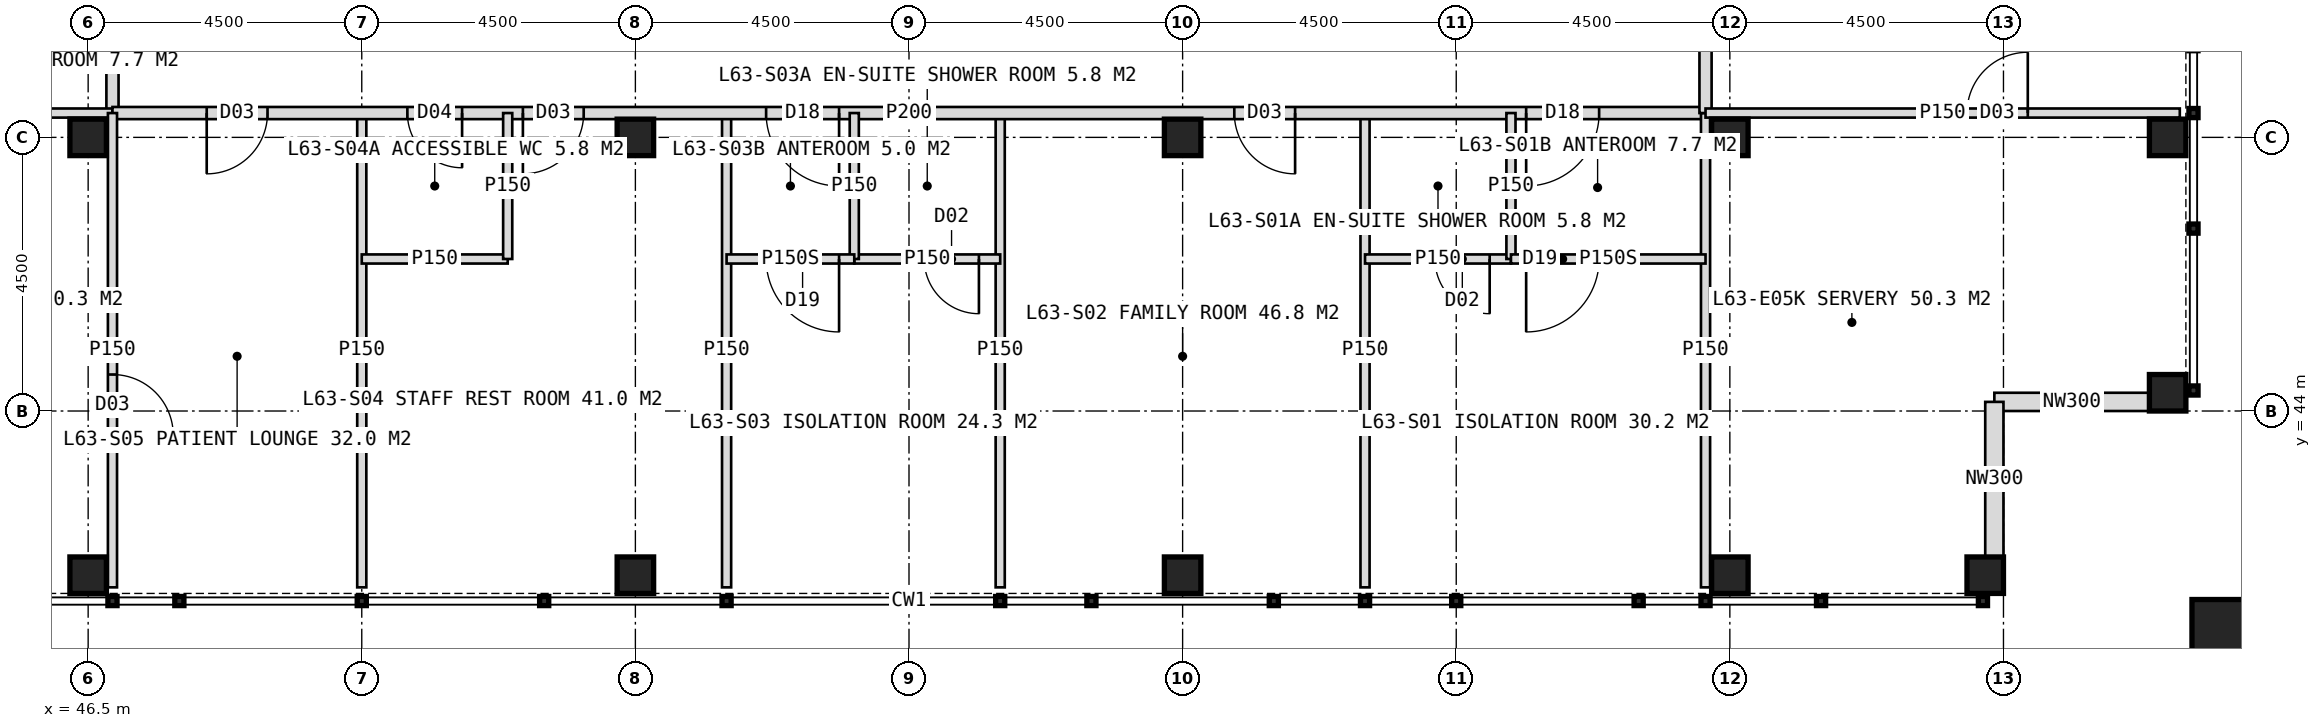
"""IFC4 building model, lengths in metres.
Left out: names, types, materials, properties, quantities, classifications, styles, units other than length and angle.
Written with IfcOpenShell. Run it as: python <this file> out.ifc"""

import sys

from ifc_helpers import new_model, si_unit, direction, frame, frame_2d, origin, origin_2d, place, context, subcontext, project, spatial, rectangle, hollow_rectangle, extrude, element, fill, save


model = new_model("IFC4")
c1 = context("Model", 3, precision=1e-05, world=origin(), true_north=direction((0.0, 1.0)))
c2 = subcontext(c1, "Body", "Model", "MODEL_VIEW")
j1 = project(units=[si_unit("LENGTHUNIT", "METRE"), si_unit("PLANEANGLEUNIT", "RADIAN")], contexts=[c1])
p1 = place(None, origin())
s1 = spatial("IfcSite", under=j1, at=p1, CompositionType="ELEMENT")
p2 = place(p1, origin())
s2 = spatial("IfcBuilding", under=s1, at=p2, CompositionType="ELEMENT")
p3 = place(p2, frame((0.0, 0.0, 262.0)))
s3 = spatial("IfcBuildingStorey", under=s2, at=p3, CompositionType="ELEMENT", Elevation=262.0)
for number, where, z_axis, x_axis in (
    (1, (46.5, 48.5, 0.0), (0.0, 0.0, 1.0), (1.0, 0.0, 0.0)),
    (2, (73.5, 48.5, 0.0), (0.0, 0.0, 1.0), (1.0, 0.0, 0.0)),
    (3, (55.5, 48.5, 0.0), (0.0, 0.0, 1.0), (1.0, 0.0, 0.0)),
    (4, (64.5, 48.5, 0.0), (0.0, 0.0, 1.0), (1.0, 0.0, 0.0)),
    (5, (80.7, 44.3, 0.0), (0.0, 0.0, 1.0), (1.0, 0.0, 0.0)),
    (6, (46.5, 41.3, 0.0), (0.0, 0.0, 1.0), (1.0, 0.0, 0.0)),
    (7, (80.7, 48.5, 0.0), (0.0, 0.0, 1.0), (1.0, 0.0, 0.0)),
    (8, (55.5, 41.3, 0.0), (0.0, 0.0, 1.0), (1.0, 0.0, 0.0)),
    (9, (64.5, 41.3, 0.0), (0.0, 0.0, 1.0), (1.0, 0.0, 0.0)),
    (10, (73.5, 41.3, 0.0), (0.0, 0.0, 1.0), (1.0, 0.0, 0.0)),
    (11, (77.7, 41.3, 0.0), (0.0, 0.0, 1.0), (1.0, 0.0, 0.0)),
):
    element("IfcColumn", number, at=place(p3, frame(where, z_axis=z_axis, x_axis=x_axis)), inside=s3, PredefinedType="COLUMN", context=c2, shape_type="SweptSolid", body=[
        extrude(hollow_rectangle(XDim=0.6, YDim=0.6, WallThickness=0.04, at=origin_2d()), origin(), (0.0, 0.0, 1.0), 4.0),
    ])
p4 = place(p3, frame((81.6, 40.4, 0.0), z_axis=(0.0, 0.0, 1.0), x_axis=(1.0, 0.0, 0.0)))
e12 = element("IfcColumn", 12, at=p4, inside=s3, PredefinedType="COLUMN", context=c2, shape_type="SweptSolid", body=[
    extrude(hollow_rectangle(XDim=1.0, YDim=1.0, WallThickness=0.06, at=origin_2d()), origin(), (0.0, 0.0, 1.0), 4.0),
])
for number, where, z_axis, x_axis in (
    (13, (80.4, 44.15, 0.0), (0.0, 0.0, 1.0), (-1.0, 0.0, 0.0)),
    (14, (77.85, 44.15, 0.0), (0.0, 0.0, 1.0), (0.0, -1.0, 0.0)),
):
    element("IfcWall", number, at=place(p3, frame(where, z_axis=z_axis, x_axis=x_axis)), inside=s3, PredefinedType="ELEMENTEDWALL", context=c2, shape_type="SweptSolid", body=[
        extrude(rectangle(XDim=2.55, YDim=0.3, at=frame_2d((1.275, 0.0))), origin(), (0.0, 0.0, 1.0), 2.95),
    ])
p5 = place(p3, frame((46.9, 48.9, 0.0), z_axis=(0.0, 0.0, 1.0), x_axis=(0.0, 1.0, 0.0)))
e15 = element("IfcWall", 15, at=p5, inside=s3, PredefinedType="PARTITIONING", context=c2, shape_type="SweptSolid", body=[
    extrude(rectangle(XDim=26.2, YDim=0.2, at=frame_2d((13.1, 0.0))), origin(), (0.0, 0.0, 1.0), 3.75),
])
p6 = place(p5, frame((1.75, 0.0, 0.0)))
e16 = element("IfcOpeningElement", 16, at=p6, cuts=e15, PredefinedType="OPENING", context=c2, shape_type="SweptSolid", body=[
    extrude(rectangle(XDim=1.2, YDim=2.2, at=frame_2d((0.6, 1.1))), frame((0.0, 0.11, 0.0), z_axis=(0.0, -1.0, 0.0), x_axis=(1.0, 0.0, 0.0)), (0.0, 0.0, 1.0), 0.22),
])
p7 = place(p5, frame((6.75, 0.0, 0.0)))
e17 = element("IfcOpeningElement", 17, at=p7, cuts=e15, PredefinedType="OPENING", context=c2, shape_type="SweptSolid", body=[
    extrude(rectangle(XDim=1.0, YDim=2.1, at=frame_2d((0.5, 1.05))), frame((0.0, 0.11, 0.0), z_axis=(0.0, -1.0, 0.0), x_axis=(1.0, 0.0, 0.0)), (0.0, 0.0, 1.0), 0.22),
])
p8 = place(p5, frame((11.1, 0.0, 0.0)))
e18 = element("IfcOpeningElement", 18, at=p8, cuts=e15, PredefinedType="OPENING", context=c2, shape_type="SweptSolid", body=[
    extrude(rectangle(XDim=1.0, YDim=2.1, at=frame_2d((0.5, 1.05))), frame((0.0, 0.11, 0.0), z_axis=(0.0, -1.0, 0.0), x_axis=(1.0, 0.0, 0.0)), (0.0, 0.0, 1.0), 0.22),
])
p9 = place(p5, frame((14.1, 0.0, 0.0)))
e19 = element("IfcOpeningElement", 19, at=p9, cuts=e15, PredefinedType="OPENING", context=c2, shape_type="SweptSolid", body=[
    extrude(rectangle(XDim=1.0, YDim=2.1, at=frame_2d((0.5, 1.05))), frame((0.0, 0.11, 0.0), z_axis=(0.0, -1.0, 0.0), x_axis=(1.0, 0.0, 0.0)), (0.0, 0.0, 1.0), 0.22),
])
p10 = place(p5, frame((18.6, 0.0, 0.0)))
e20 = element("IfcOpeningElement", 20, at=p10, cuts=e15, PredefinedType="OPENING", context=c2, shape_type="SweptSolid", body=[
    extrude(rectangle(XDim=1.0, YDim=2.1, at=frame_2d((0.5, 1.05))), frame((0.0, 0.11, 0.0), z_axis=(0.0, -1.0, 0.0), x_axis=(1.0, 0.0, 0.0)), (0.0, 0.0, 1.0), 0.22),
])
p11 = place(p5, frame((23.65, 0.0, 0.0)))
e21 = element("IfcOpeningElement", 21, at=p11, cuts=e15, PredefinedType="OPENING", context=c2, shape_type="SweptSolid", body=[
    extrude(rectangle(XDim=1.0, YDim=2.1, at=frame_2d((0.5, 1.05))), frame((0.0, 0.11, 0.0), z_axis=(0.0, -1.0, 0.0), x_axis=(1.0, 0.0, 0.0)), (0.0, 0.0, 1.0), 0.22),
])
for number, where, z_axis, x_axis in (
    (22, (46.9, 48.9, 0.0), (0.0, 0.0, 1.0), (-1.0, 0.0, 0.0)),
    (23, (67.5, 48.9, 0.0), (0.0, 0.0, 1.0), (0.0, -1.0, 0.0)),
    (24, (61.5, 48.9, 0.0), (0.0, 0.0, 1.0), (0.0, -1.0, 0.0)),
    (25, (57.0, 48.9, 0.0), (0.0, 0.0, 1.0), (0.0, -1.0, 0.0)),
    (26, (51.0, 48.9, 0.0), (0.0, 0.0, 1.0), (0.0, -1.0, 0.0)),
):
    element("IfcWall", number, at=place(p3, frame(where, z_axis=z_axis, x_axis=x_axis)), inside=s3, PredefinedType="PARTITIONING", context=c2, shape_type="SweptSolid", body=[
        extrude(rectangle(XDim=7.8, YDim=0.15, at=frame_2d((3.9, 0.0))), origin(), (0.0, 0.0, 1.0), 3.75),
    ])
p12 = place(p3, frame((73.1, 48.9, 0.0), z_axis=(0.0, 0.0, 1.0), x_axis=(-1.0, 0.0, 0.0)))
e27 = element("IfcWall", 27, at=p12, inside=s3, PredefinedType="PARTITIONING", context=c2, shape_type="SweptSolid", body=[
    extrude(rectangle(XDim=26.2, YDim=0.2, at=frame_2d((13.1, 0.0))), origin(), (0.0, 0.0, 1.0), 3.75),
])
p13 = place(p12, frame((1.75, 0.0, 0.0)))
e28 = element("IfcOpeningElement", 28, at=p13, cuts=e27, PredefinedType="OPENING", context=c2, shape_type="SweptSolid", body=[
    extrude(rectangle(XDim=1.2, YDim=2.2, at=frame_2d((0.6, 1.1))), frame((0.0, 0.11, 0.0), z_axis=(0.0, -1.0, 0.0), x_axis=(1.0, 0.0, 0.0)), (0.0, 0.0, 1.0), 0.22),
])
p14 = place(p12, frame((6.75, 0.0, 0.0)))
e29 = element("IfcOpeningElement", 29, at=p14, cuts=e27, PredefinedType="OPENING", context=c2, shape_type="SweptSolid", body=[
    extrude(rectangle(XDim=1.0, YDim=2.1, at=frame_2d((0.5, 1.05))), frame((0.0, 0.11, 0.0), z_axis=(0.0, -1.0, 0.0), x_axis=(1.0, 0.0, 0.0)), (0.0, 0.0, 1.0), 0.22),
])
p15 = place(p12, frame((14.25, 0.0, 0.0)))
e30 = element("IfcOpeningElement", 30, at=p15, cuts=e27, PredefinedType="OPENING", context=c2, shape_type="SweptSolid", body=[
    extrude(rectangle(XDim=1.2, YDim=2.2, at=frame_2d((0.6, 1.1))), frame((0.0, 0.11, 0.0), z_axis=(0.0, -1.0, 0.0), x_axis=(1.0, 0.0, 0.0)), (0.0, 0.0, 1.0), 0.22),
])
p16 = place(p12, frame((20.45, 0.0, 0.0)))
e31 = element("IfcOpeningElement", 31, at=p16, cuts=e27, PredefinedType="OPENING", context=c2, shape_type="SweptSolid", body=[
    extrude(rectangle(XDim=0.9, YDim=2.1, at=frame_2d((0.45, 1.05))), frame((0.0, 0.11, 0.0), z_axis=(0.0, -1.0, 0.0), x_axis=(1.0, 0.0, 0.0)), (0.0, 0.0, 1.0), 0.22),
])
p17 = place(p12, frame((18.45, 0.0, 0.0)))
e32 = element("IfcOpeningElement", 32, at=p17, cuts=e27, PredefinedType="OPENING", context=c2, shape_type="SweptSolid", body=[
    extrude(rectangle(XDim=1.0, YDim=2.1, at=frame_2d((0.5, 1.05))), frame((0.0, 0.11, 0.0), z_axis=(0.0, -1.0, 0.0), x_axis=(1.0, 0.0, 0.0)), (0.0, 0.0, 1.0), 0.22),
])
p18 = place(p12, frame((23.65, 0.0, 0.0)))
e33 = element("IfcOpeningElement", 33, at=p18, cuts=e27, PredefinedType="OPENING", context=c2, shape_type="SweptSolid", body=[
    extrude(rectangle(XDim=1.0, YDim=2.1, at=frame_2d((0.5, 1.05))), frame((0.0, 0.11, 0.0), z_axis=(0.0, -1.0, 0.0), x_axis=(1.0, 0.0, 0.0)), (0.0, 0.0, 1.0), 0.22),
])
p19 = place(p3, frame((73.1, 48.9, 0.0), z_axis=(0.0, 0.0, 1.0), x_axis=(0.0, -1.0, 0.0)))
e34 = element("IfcWall", 34, at=p19, inside=s3, PredefinedType="PARTITIONING", context=c2, shape_type="SweptSolid", body=[
    extrude(rectangle(XDim=7.8, YDim=0.15, at=frame_2d((3.9, 0.0))), origin(), (0.0, 0.0, 1.0), 3.75),
])
p20 = place(p3, frame((69.9, 46.5, 0.0), z_axis=(0.0, 0.0, 1.0), x_axis=(-1.0, 0.0, 0.0)))
e35 = element("IfcWall", 35, at=p20, inside=s3, PredefinedType="PARTITIONING", context=c2, shape_type="SweptSolid", body=[
    extrude(rectangle(XDim=2.4, YDim=0.15, at=frame_2d((1.2, 0.0))), origin(), (0.0, 0.0, 1.0), 3.75),
])
p21 = place(p20, frame((0.35, 0.0, 0.0)))
e36 = element("IfcOpeningElement", 36, at=p21, cuts=e35, PredefinedType="OPENING", context=c2, shape_type="SweptSolid", body=[
    extrude(rectangle(XDim=0.9, YDim=2.1, at=frame_2d((0.45, 1.05))), frame((0.0, 0.085, 0.0), z_axis=(0.0, -1.0, 0.0), x_axis=(1.0, 0.0, 0.0)), (0.0, 0.0, 1.0), 0.17),
])
p22 = place(p3, frame((69.9, 48.9, 0.0), z_axis=(0.0, 0.0, 1.0), x_axis=(0.0, -1.0, 0.0)))
e37 = element("IfcWall", 37, at=p22, inside=s3, PredefinedType="PARTITIONING", context=c2, shape_type="SweptSolid", body=[
    extrude(rectangle(XDim=2.4, YDim=0.15, at=frame_2d((1.2, 0.0))), origin(), (0.0, 0.0, 1.0), 3.75),
])
p23 = place(p3, frame((73.1, 46.5, 0.0), z_axis=(0.0, 0.0, 1.0), x_axis=(-1.0, 0.0, 0.0)))
e38 = element("IfcWall", 38, at=p23, inside=s3, PredefinedType="PARTITIONING", context=c2, shape_type="SweptSolid", body=[
    extrude(rectangle(XDim=3.2, YDim=0.15, at=frame_2d((1.6, 0.0))), origin(), (0.0, 0.0, 1.0), 3.75),
])
p24 = place(p23, frame((1.75, 0.0, 0.0)))
e39 = element("IfcOpeningElement", 39, at=p24, cuts=e38, PredefinedType="OPENING", context=c2, shape_type="SweptSolid", body=[
    extrude(rectangle(XDim=1.2, YDim=2.2, at=frame_2d((0.6, 1.1))), frame((0.0, 0.085, 0.0), z_axis=(0.0, -1.0, 0.0), x_axis=(1.0, 0.0, 0.0)), (0.0, 0.0, 1.0), 0.17),
])
p25 = place(p3, frame((61.5, 46.5, 0.0), z_axis=(0.0, 0.0, 1.0), x_axis=(-1.0, 0.0, 0.0)))
e40 = element("IfcWall", 40, at=p25, inside=s3, PredefinedType="PARTITIONING", context=c2, shape_type="SweptSolid", body=[
    extrude(rectangle(XDim=2.4, YDim=0.15, at=frame_2d((1.2, 0.0))), origin(), (0.0, 0.0, 1.0), 3.75),
])
p26 = place(p25, frame((0.35, 0.0, 0.0)))
e41 = element("IfcOpeningElement", 41, at=p26, cuts=e40, PredefinedType="OPENING", context=c2, shape_type="SweptSolid", body=[
    extrude(rectangle(XDim=0.9, YDim=2.1, at=frame_2d((0.45, 1.05))), frame((0.0, 0.085, 0.0), z_axis=(0.0, -1.0, 0.0), x_axis=(1.0, 0.0, 0.0)), (0.0, 0.0, 1.0), 0.17),
])
p27 = place(p3, frame((59.1, 48.9, 0.0), z_axis=(0.0, 0.0, 1.0), x_axis=(0.0, -1.0, 0.0)))
e42 = element("IfcWall", 42, at=p27, inside=s3, PredefinedType="PARTITIONING", context=c2, shape_type="SweptSolid", body=[
    extrude(rectangle(XDim=2.4, YDim=0.15, at=frame_2d((1.2, 0.0))), origin(), (0.0, 0.0, 1.0), 3.75),
])
p28 = place(p3, frame((59.1, 46.5, 0.0), z_axis=(0.0, 0.0, 1.0), x_axis=(-1.0, 0.0, 0.0)))
e43 = element("IfcWall", 43, at=p28, inside=s3, PredefinedType="PARTITIONING", context=c2, shape_type="SweptSolid", body=[
    extrude(rectangle(XDim=2.1, YDim=0.15, at=frame_2d((1.05, 0.0))), origin(), (0.0, 0.0, 1.0), 3.75),
])
p29 = place(p28, frame((0.25, 0.0, 0.0)))
e44 = element("IfcOpeningElement", 44, at=p29, cuts=e43, PredefinedType="OPENING", context=c2, shape_type="SweptSolid", body=[
    extrude(rectangle(XDim=1.2, YDim=2.2, at=frame_2d((0.6, 1.1))), frame((0.0, 0.085, 0.0), z_axis=(0.0, -1.0, 0.0), x_axis=(1.0, 0.0, 0.0)), (0.0, 0.0, 1.0), 0.17),
])
for number, where, z_axis, x_axis in (
    (45, (53.4, 46.5, 0.0), (0.0, 0.0, 1.0), (-1.0, 0.0, 0.0)),
    (46, (53.4, 48.9, 0.0), (0.0, 0.0, 1.0), (0.0, -1.0, 0.0)),
):
    element("IfcWall", number, at=place(p3, frame(where, z_axis=z_axis, x_axis=x_axis)), inside=s3, PredefinedType="PARTITIONING", context=c2, shape_type="SweptSolid", body=[
        extrude(rectangle(XDim=2.4, YDim=0.15, at=frame_2d((1.2, 0.0))), origin(), (0.0, 0.0, 1.0), 3.75),
    ])
p30 = place(p3, frame((46.9, 48.9, 0.0), z_axis=(0.0, 0.0, 1.0), x_axis=(0.0, -1.0, 0.0)))
e47 = element("IfcWall", 47, at=p30, inside=s3, PredefinedType="PARTITIONING", context=c2, shape_type="SweptSolid", body=[
    extrude(rectangle(XDim=7.8, YDim=0.15, at=frame_2d((3.9, 0.0))), origin(), (0.0, 0.0, 1.0), 3.75),
])
p31 = place(p30, frame((4.3, 0.0, 0.0)))
e48 = element("IfcOpeningElement", 48, at=p31, cuts=e47, PredefinedType="OPENING", context=c2, shape_type="SweptSolid", body=[
    extrude(rectangle(XDim=1.0, YDim=2.1, at=frame_2d((0.5, 1.05))), frame((0.0, 0.085, 0.0), z_axis=(0.0, -1.0, 0.0), x_axis=(1.0, 0.0, 0.0)), (0.0, 0.0, 1.0), 0.17),
])
p32 = place(p3, frame((73.1, 71.0, 0.0), z_axis=(0.0, 0.0, 1.0), x_axis=(0.0, -1.0, 0.0)))
e49 = element("IfcWall", 49, at=p32, inside=s3, PredefinedType="PARTITIONING", context=c2, shape_type="SweptSolid", body=[
    extrude(rectangle(XDim=22.1, YDim=0.2, at=frame_2d((11.05, 0.0))), origin(), (0.0, 0.0, 1.0), 3.75),
])
p33 = place(p32, frame((2.65, 0.0, 0.0)))
e50 = element("IfcOpeningElement", 50, at=p33, cuts=e49, PredefinedType="OPENING", context=c2, shape_type="SweptSolid", body=[
    extrude(rectangle(XDim=1.0, YDim=2.1, at=frame_2d((0.5, 1.05))), frame((0.0, 0.11, 0.0), z_axis=(0.0, -1.0, 0.0), x_axis=(1.0, 0.0, 0.0)), (0.0, 0.0, 1.0), 0.22),
])
p34 = place(p32, frame((7.0, 0.0, 0.0)))
e51 = element("IfcOpeningElement", 51, at=p34, cuts=e49, PredefinedType="OPENING", context=c2, shape_type="SweptSolid", body=[
    extrude(rectangle(XDim=1.0, YDim=2.1, at=frame_2d((0.5, 1.05))), frame((0.0, 0.11, 0.0), z_axis=(0.0, -1.0, 0.0), x_axis=(1.0, 0.0, 0.0)), (0.0, 0.0, 1.0), 0.22),
])
p35 = place(p32, frame((14.35, 0.0, 0.0)))
e52 = element("IfcOpeningElement", 52, at=p35, cuts=e49, PredefinedType="OPENING", context=c2, shape_type="SweptSolid", body=[
    extrude(rectangle(XDim=1.2, YDim=2.2, at=frame_2d((0.6, 1.1))), frame((0.0, 0.11, 0.0), z_axis=(0.0, -1.0, 0.0), x_axis=(1.0, 0.0, 0.0)), (0.0, 0.0, 1.0), 0.22),
])
p36 = place(p32, frame((18.7, 0.0, 0.0)))
e53 = element("IfcOpeningElement", 53, at=p36, cuts=e49, PredefinedType="OPENING", context=c2, shape_type="SweptSolid", body=[
    extrude(rectangle(XDim=1.2, YDim=2.2, at=frame_2d((0.6, 1.1))), frame((0.0, 0.11, 0.0), z_axis=(0.0, -1.0, 0.0), x_axis=(1.0, 0.0, 0.0)), (0.0, 0.0, 1.0), 0.22),
])
p37 = place(p3, frame((73.1, 48.9, 0.0), z_axis=(0.0, 0.0, 1.0), x_axis=(1.0, 0.0, 0.0)))
e54 = element("IfcWall", 54, at=p37, inside=s3, PredefinedType="PARTITIONING", context=c2, shape_type="SweptSolid", body=[
    extrude(rectangle(XDim=7.8, YDim=0.15, at=frame_2d((3.9, 0.0))), origin(), (0.0, 0.0, 1.0), 3.75),
])
p38 = place(p37, frame((4.3, 0.0, 0.0)))
e55 = element("IfcOpeningElement", 55, at=p38, cuts=e54, PredefinedType="OPENING", context=c2, shape_type="SweptSolid", body=[
    extrude(rectangle(XDim=1.0, YDim=2.1, at=frame_2d((0.5, 1.05))), frame((0.0, 0.085, 0.0), z_axis=(0.0, -1.0, 0.0), x_axis=(1.0, 0.0, 0.0)), (0.0, 0.0, 1.0), 0.17),
])
p39 = place(p24, origin())
e56 = element("IfcDoor", 56, at=p39, inside=s3, OperationType="SINGLE_SWING_RIGHT", PredefinedType="DOOR", context=c2, shape_type="SweptSolid", body=[
    extrude(rectangle(XDim=1.2, YDim=2.2, at=frame_2d((0.6, 1.1))), frame((0.0, 0.025, 0.0), z_axis=(0.0, -1.0, 0.0), x_axis=(1.0, 0.0, 0.0)), (0.0, 0.0, 1.0), 0.05),
])
fill(e39, e56)
p40 = place(p13, origin())
e57 = element("IfcDoor", 57, at=p40, inside=s3, OperationType="SINGLE_SWING_RIGHT", PredefinedType="DOOR", context=c2, shape_type="SweptSolid", body=[
    extrude(rectangle(XDim=1.2, YDim=2.2, at=frame_2d((0.6, 1.1))), frame((0.0, 0.025, 0.0), z_axis=(0.0, -1.0, 0.0), x_axis=(1.0, 0.0, 0.0)), (0.0, 0.0, 1.0), 0.05),
])
fill(e28, e57)
p41 = place(p21, origin())
e58 = element("IfcDoor", 58, at=p41, inside=s3, OperationType="SINGLE_SWING_LEFT", PredefinedType="DOOR", context=c2, shape_type="SweptSolid", body=[
    extrude(rectangle(XDim=0.9, YDim=2.1, at=frame_2d((0.45, 1.05))), frame((0.0, 0.025, 0.0), z_axis=(0.0, -1.0, 0.0), x_axis=(1.0, 0.0, 0.0)), (0.0, 0.0, 1.0), 0.05),
])
fill(e36, e58)
p42 = place(p14, origin())
e59 = element("IfcDoor", 59, at=p42, inside=s3, OperationType="SINGLE_SWING_LEFT", PredefinedType="DOOR", context=c2, shape_type="SweptSolid", body=[
    extrude(rectangle(XDim=1.0, YDim=2.1, at=frame_2d((0.5, 1.05))), frame((0.0, 0.025, 0.0), z_axis=(0.0, -1.0, 0.0), x_axis=(1.0, 0.0, 0.0)), (0.0, 0.0, 1.0), 0.05),
])
fill(e29, e59)
p43 = place(p29, origin())
e60 = element("IfcDoor", 60, at=p43, inside=s3, OperationType="SINGLE_SWING_LEFT", PredefinedType="DOOR", context=c2, shape_type="SweptSolid", body=[
    extrude(rectangle(XDim=1.2, YDim=2.2, at=frame_2d((0.6, 1.1))), frame((0.0, 0.025, 0.0), z_axis=(0.0, -1.0, 0.0), x_axis=(1.0, 0.0, 0.0)), (0.0, 0.0, 1.0), 0.05),
])
fill(e44, e60)
p44 = place(p15, origin())
e61 = element("IfcDoor", 61, at=p44, inside=s3, OperationType="SINGLE_SWING_LEFT", PredefinedType="DOOR", context=c2, shape_type="SweptSolid", body=[
    extrude(rectangle(XDim=1.2, YDim=2.2, at=frame_2d((0.6, 1.1))), frame((0.0, 0.025, 0.0), z_axis=(0.0, -1.0, 0.0), x_axis=(1.0, 0.0, 0.0)), (0.0, 0.0, 1.0), 0.05),
])
fill(e30, e61)
p45 = place(p26, origin())
e62 = element("IfcDoor", 62, at=p45, inside=s3, OperationType="SINGLE_SWING_LEFT", PredefinedType="DOOR", context=c2, shape_type="SweptSolid", body=[
    extrude(rectangle(XDim=0.9, YDim=2.1, at=frame_2d((0.45, 1.05))), frame((0.0, 0.025, 0.0), z_axis=(0.0, -1.0, 0.0), x_axis=(1.0, 0.0, 0.0)), (0.0, 0.0, 1.0), 0.05),
])
fill(e41, e62)
p46 = place(p16, origin())
e63 = element("IfcDoor", 63, at=p46, inside=s3, OperationType="SINGLE_SWING_LEFT", PredefinedType="DOOR", context=c2, shape_type="SweptSolid", body=[
    extrude(rectangle(XDim=0.9, YDim=2.1, at=frame_2d((0.45, 1.05))), frame((0.0, 0.025, 0.0), z_axis=(0.0, -1.0, 0.0), x_axis=(1.0, 0.0, 0.0)), (0.0, 0.0, 1.0), 0.05),
])
fill(e31, e63)
p47 = place(p17, origin())
e64 = element("IfcDoor", 64, at=p47, inside=s3, OperationType="SINGLE_SWING_RIGHT", PredefinedType="DOOR", context=c2, shape_type="SweptSolid", body=[
    extrude(rectangle(XDim=1.0, YDim=2.1, at=frame_2d((0.5, 1.05))), frame((0.0, 0.025, 0.0), z_axis=(0.0, -1.0, 0.0), x_axis=(1.0, 0.0, 0.0)), (0.0, 0.0, 1.0), 0.05),
])
fill(e32, e64)
p48 = place(p31, origin())
e65 = element("IfcDoor", 65, at=p48, inside=s3, OperationType="SINGLE_SWING_RIGHT", PredefinedType="DOOR", context=c2, shape_type="SweptSolid", body=[
    extrude(rectangle(XDim=1.0, YDim=2.1, at=frame_2d((0.5, 1.05))), frame((0.0, 0.025, 0.0), z_axis=(0.0, -1.0, 0.0), x_axis=(1.0, 0.0, 0.0)), (0.0, 0.0, 1.0), 0.05),
])
fill(e48, e65)
p49 = place(p18, origin())
e66 = element("IfcDoor", 66, at=p49, inside=s3, OperationType="SINGLE_SWING_RIGHT", PredefinedType="DOOR", context=c2, shape_type="SweptSolid", body=[
    extrude(rectangle(XDim=1.0, YDim=2.1, at=frame_2d((0.5, 1.05))), frame((0.0, 0.025, 0.0), z_axis=(0.0, -1.0, 0.0), x_axis=(1.0, 0.0, 0.0)), (0.0, 0.0, 1.0), 0.05),
])
fill(e33, e66)
p50 = place(p38, origin())
e67 = element("IfcDoor", 67, at=p50, inside=s3, OperationType="SINGLE_SWING_RIGHT", PredefinedType="DOOR", context=c2, shape_type="SweptSolid", body=[
    extrude(rectangle(XDim=1.0, YDim=2.1, at=frame_2d((0.5, 1.05))), frame((0.0, 0.025, 0.0), z_axis=(0.0, -1.0, 0.0), x_axis=(1.0, 0.0, 0.0)), (0.0, 0.0, 1.0), 0.05),
])
fill(e55, e67)
save(model, sys.argv[1])
